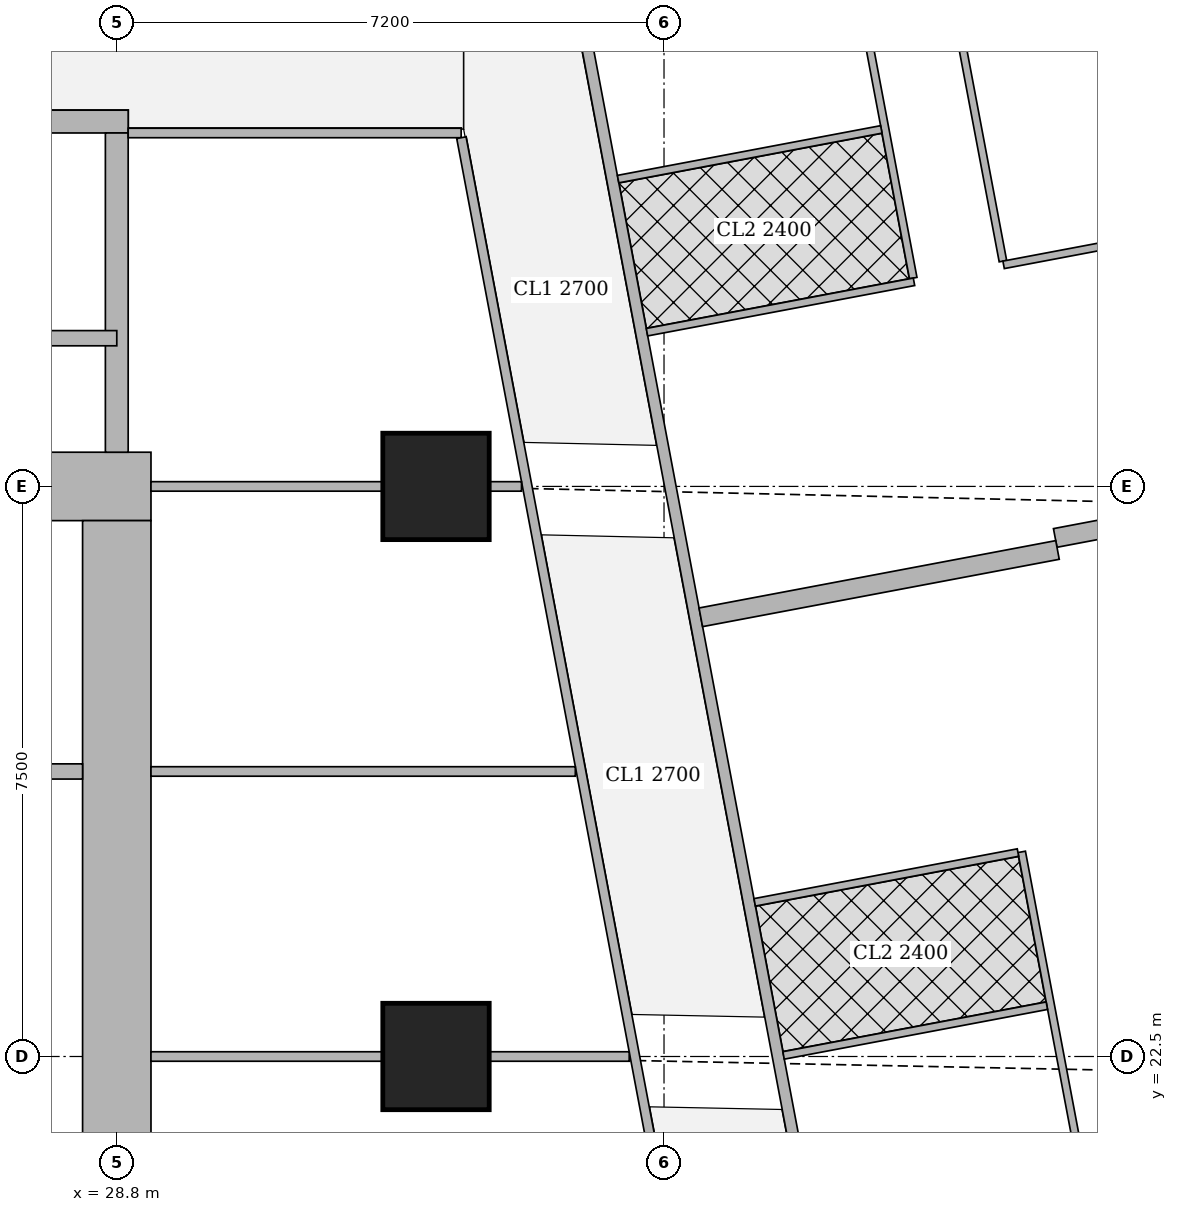
"""IFC4 building model, lengths in metres.
Left out: names, types, materials, properties, quantities, classifications, styles, units other than length and angle.
Written with IfcOpenShell. Run it as: python <this file> out.ifc"""

import sys

from ifc_helpers import new_model, si_unit, direction, frame, frame_2d, origin, origin_2d, place, context, subcontext, project, spatial, rectangle, extrude, element, fill, save


model = new_model("IFC4")
c1 = context("Model", 3, precision=1e-05, world=origin(), true_north=direction((0.0, 1.0)))
c2 = subcontext(c1, "Body", "Model", "MODEL_VIEW")
j1 = project(units=[si_unit("LENGTHUNIT", "METRE"), si_unit("PLANEANGLEUNIT", "RADIAN")], contexts=[c1])
p1 = place(None, origin())
s1 = spatial("IfcSite", under=j1, at=p1, CompositionType="ELEMENT")
p2 = place(p1, origin())
s2 = spatial("IfcBuilding", under=s1, at=p2, CompositionType="ELEMENT")
p3 = place(p2, frame((0.0, 0.0, 204.95)))
s3 = spatial("IfcBuildingStorey", under=s2, at=p3, CompositionType="ELEMENT", Elevation=204.95)
for number, where, z_axis, x_axis in (
    (1, (33.0, 22.5, 0.0), (0.0, 0.0, 1.0), (1.0, 0.0, 0.0)),
    (2, (33.0, 30.0, 0.0), (0.0, 0.0, 1.0), (1.0, 0.0, 0.0)),
):
    element("IfcColumn", number, at=place(p3, frame(where, z_axis=z_axis, x_axis=x_axis)), inside=s3, PredefinedType="COLUMN", context=c2, shape_type="SweptSolid", body=[
        extrude(rectangle(XDim=1.4, YDim=1.4, at=origin_2d()), origin(), (0.0, 0.0, 1.0), 3.75),
    ])
p4 = place(p3, frame((13.95, 30.0, 0.0), z_axis=(0.0, 0.0, 1.0), x_axis=(1.0, 0.0, 0.0)))
e3 = element("IfcWall", 3, at=p4, inside=s3, PredefinedType="SHEAR", context=c2, shape_type="SweptSolid", body=[
    extrude(rectangle(XDim=15.3, YDim=0.9, at=frame_2d((7.65, 0.0))), origin(), (0.0, 0.0, 1.0), 3.75),
])
p5 = place(p4, frame((4.45, 0.0, 0.0)))
e4 = element("IfcOpeningElement", 4, at=p5, cuts=e3, PredefinedType="OPENING", context=c2, shape_type="SweptSolid", body=[
    extrude(rectangle(XDim=1.8, YDim=2.1, at=frame_2d((0.9, 1.05))), frame((0.0, 0.46, 0.0), z_axis=(0.0, -1.0, 0.0), x_axis=(1.0, 0.0, 0.0)), (0.0, 0.0, 1.0), 0.92),
])
p6 = place(p4, frame((10.7, 0.0, 0.0)))
e5 = element("IfcOpeningElement", 5, at=p6, cuts=e3, PredefinedType="OPENING", context=c2, shape_type="SweptSolid", body=[
    extrude(rectangle(XDim=1.1, YDim=2.1, at=frame_2d((0.55, 1.05))), frame((0.0, 0.46, 0.0), z_axis=(0.0, -1.0, 0.0), x_axis=(1.0, 0.0, 0.0)), (0.0, 0.0, 1.0), 0.92),
])
p7 = place(p3, frame((28.8, 15.45, 0.0), z_axis=(0.0, 0.0, 1.0), x_axis=(0.0, 1.0, 0.0)))
e6 = element("IfcWall", 6, at=p7, inside=s3, PredefinedType="SHEAR", context=c2, shape_type="SweptSolid", body=[
    extrude(rectangle(XDim=14.1, YDim=0.9, at=frame_2d((7.05, 0.0))), origin(), (0.0, 0.0, 1.0), 3.75),
])
p8 = place(p3, frame((21.45, 34.8, 0.0), z_axis=(0.0, 0.0, 1.0), x_axis=(1.0, 0.0, 0.0)))
e7 = element("IfcWall", 7, at=p8, inside=s3, PredefinedType="SHEAR", context=c2, shape_type="SweptSolid", body=[
    extrude(rectangle(XDim=7.5, YDim=0.3, at=frame_2d((3.75, 0.0))), origin(), (0.0, 0.0, 1.0), 3.75),
])
p9 = place(p8, frame((0.5, 0.0, 0.0)))
e8 = element("IfcOpeningElement", 8, at=p9, cuts=e7, PredefinedType="OPENING", context=c2, shape_type="SweptSolid", body=[
    extrude(rectangle(XDim=1.1, YDim=2.1, at=frame_2d((0.55, 1.05))), frame((0.0, 0.16, 0.0), z_axis=(0.0, -1.0, 0.0), x_axis=(1.0, 0.0, 0.0)), (0.0, 0.0, 1.0), 0.32),
])
p10 = place(p3, frame((28.8, 30.45, 0.0), z_axis=(0.0, 0.0, 1.0), x_axis=(0.0, 1.0, 0.0)))
e9 = element("IfcWall", 9, at=p10, inside=s3, PredefinedType="SHEAR", context=c2, shape_type="SweptSolid", body=[
    extrude(rectangle(XDim=4.2, YDim=0.3, at=frame_2d((2.1, 0.0))), origin(), (0.0, 0.0, 1.0), 3.75),
])
p11 = place(p3, frame((33.68, 42.723, 0.0), z_axis=(0.0, 0.0, 1.0), x_axis=(0.185601160014, -0.982625162207, 0.0)))
e10 = element("IfcWall", 10, at=p11, inside=s3, PredefinedType="SOLIDWALL", context=c2, shape_type="SweptSolid", body=[
    extrude(rectangle(XDim=41.051, YDim=0.15, at=frame_2d((20.526, 0.0))), origin(), (0.0, 0.0, 1.0), 2.5),
])
p12 = place(p11, frame((12.307, 0.0, 0.0)))
e11 = element("IfcOpeningElement", 11, at=p12, cuts=e10, PredefinedType="OPENING", context=c2, shape_type="SweptSolid", body=[
    extrude(rectangle(XDim=1.0, YDim=2.1, at=frame_2d((0.5, 1.05))), frame((0.0, 0.085, 0.0), z_axis=(0.0, -1.0, 0.0), x_axis=(1.0, 0.0, 0.0)), (0.0, 0.0, 1.0), 0.17),
])
p13 = place(p11, frame((16.123, 0.0, 0.0)))
e12 = element("IfcOpeningElement", 12, at=p13, cuts=e10, PredefinedType="OPENING", context=c2, shape_type="SweptSolid", body=[
    extrude(rectangle(XDim=1.0, YDim=2.1, at=frame_2d((0.5, 1.05))), frame((0.0, 0.085, 0.0), z_axis=(0.0, -1.0, 0.0), x_axis=(1.0, 0.0, 0.0)), (0.0, 0.0, 1.0), 0.17),
])
p14 = place(p11, frame((30.902, 0.0, 0.0)))
e13 = element("IfcOpeningElement", 13, at=p14, cuts=e10, PredefinedType="OPENING", context=c2, shape_type="SweptSolid", body=[
    extrude(rectangle(XDim=1.0, YDim=2.1, at=frame_2d((0.5, 1.05))), frame((0.0, 0.085, 0.0), z_axis=(0.0, -1.0, 0.0), x_axis=(1.0, 0.0, 0.0)), (0.0, 0.0, 1.0), 0.17),
])
p15 = place(p3, frame((38.764, 41.941, 0.0), z_axis=(0.0, 0.0, 1.0), x_axis=(0.185548572312, -0.982635093671, 0.0)))
e14 = element("IfcWall", 14, at=p15, inside=s3, PredefinedType="PARTITIONING", context=c2, shape_type="SweptSolid", body=[
    extrude(rectangle(XDim=9.135, YDim=0.1, at=frame_2d((4.568, 0.0))), origin(), (0.0, 0.0, 1.0), 3.5),
])
p16 = place(p15, frame((8.085, 0.0, 0.0)))
e15 = element("IfcOpeningElement", 15, at=p16, cuts=e14, PredefinedType="OPENING", context=c2, shape_type="SweptSolid", body=[
    extrude(rectangle(XDim=0.9, YDim=2.1, at=frame_2d((0.45, 1.05))), frame((0.0, 0.06, 0.0), z_axis=(0.0, -1.0, 0.0), x_axis=(1.0, 0.0, 0.0)), (0.0, 0.0, 1.0), 0.12),
])
p17 = place(p15, frame((3.7, 0.0, 0.0)))
e16 = element("IfcOpeningElement", 16, at=p17, cuts=e14, PredefinedType="OPENING", context=c2, shape_type="SweptSolid", body=[
    extrude(rectangle(XDim=0.9, YDim=2.1, at=frame_2d((0.45, 1.05))), frame((0.0, 0.06, 0.0), z_axis=(0.0, -1.0, 0.0), x_axis=(1.0, 0.0, 0.0)), (0.0, 0.0, 1.0), 0.12),
])
p18 = place(p3, frame((37.473, 42.309, 0.0), z_axis=(0.0, 0.0, 1.0), x_axis=(0.185491912953, -0.982645790827, 0.0)))
e17 = element("IfcWall", 17, at=p18, inside=s3, PredefinedType="PARTITIONING", context=c2, shape_type="SweptSolid", body=[
    extrude(rectangle(XDim=9.737, YDim=0.1, at=frame_2d((4.869, 0.0))), origin(), (0.0, 0.0, 1.0), 3.5),
])
p19 = place(p18, frame((8.312, 0.0, 0.0)))
e18 = element("IfcOpeningElement", 18, at=p19, cuts=e17, PredefinedType="OPENING", context=c2, shape_type="SweptSolid", body=[
    extrude(rectangle(XDim=0.9, YDim=2.1, at=frame_2d((0.45, 1.05))), frame((0.0, 0.06, 0.0), z_axis=(0.0, -1.0, 0.0), x_axis=(1.0, 0.0, 0.0)), (0.0, 0.0, 1.0), 0.12),
])
p20 = place(p18, frame((2.853, 0.0, 0.0)))
e19 = element("IfcOpeningElement", 19, at=p20, cuts=e17, PredefinedType="OPENING", context=c2, shape_type="SweptSolid", body=[
    extrude(rectangle(XDim=0.9, YDim=2.1, at=frame_2d((0.45, 1.05))), frame((0.0, 0.06, 0.0), z_axis=(0.0, -1.0, 0.0), x_axis=(1.0, 0.0, 0.0)), (0.0, 0.0, 1.0), 0.12),
])
p21 = place(p18, frame((5.644, 0.0, 0.0)))
e20 = element("IfcOpeningElement", 20, at=p21, cuts=e17, PredefinedType="OPENING", context=c2, shape_type="SweptSolid", body=[
    extrude(rectangle(XDim=0.9, YDim=2.1, at=frame_2d((0.45, 1.05))), frame((0.0, 0.06, 0.0), z_axis=(0.0, -1.0, 0.0), x_axis=(1.0, 0.0, 0.0)), (0.0, 0.0, 1.0), 0.12),
])
p22 = place(p3, frame((44.693, 33.713, 0.0), z_axis=(0.0, 0.0, 1.0), x_axis=(-0.982633535512, -0.185556823879, 0.0)))
e21 = element("IfcWall", 21, at=p22, inside=s3, PredefinedType="PARTITIONING", context=c2, shape_type="SweptSolid", body=[
    extrude(rectangle(XDim=4.3, YDim=0.1, at=frame_2d((2.15, 0.0))), origin(), (0.0, 0.0, 1.0), 2.05),
])
p23 = place(p3, frame((39.289, 32.692, 0.0), z_axis=(0.0, 0.0, 1.0), x_axis=(-0.982662827464, -0.185401638399, 0.0)))
e22 = element("IfcWall", 22, at=p23, inside=s3, PredefinedType="PARTITIONING", context=c2, shape_type="SweptSolid", body=[
    extrude(rectangle(XDim=3.575, YDim=0.1, at=frame_2d((1.788, 0.0))), origin(), (0.0, 0.0, 1.0), 3.5),
])
p24 = place(p3, frame((38.859, 34.697, 0.0), z_axis=(0.0, 0.0, 1.0), x_axis=(-0.982626628545, -0.185593396635, 0.0)))
e23 = element("IfcWall", 23, at=p24, inside=s3, PredefinedType="PARTITIONING", context=c2, shape_type="SweptSolid", body=[
    extrude(rectangle(XDim=3.524, YDim=0.1, at=frame_2d((1.762, 0.0))), origin(), (0.0, 0.0, 1.0), 3.5),
])
p25 = place(p3, frame((40.706, 25.192, 0.0), z_axis=(0.0, 0.0, 1.0), x_axis=(0.185629824463, -0.982619747547, 0.0)))
e24 = element("IfcWall", 24, at=p25, inside=s3, PredefinedType="PARTITIONING", context=c2, shape_type="SweptSolid", body=[
    extrude(rectangle(XDim=9.659, YDim=0.1, at=frame_2d((4.83, 0.0))), origin(), (0.0, 0.0, 1.0), 2.5),
])
p26 = place(p25, frame((0.575, 0.0, 0.0)))
e25 = element("IfcOpeningElement", 25, at=p26, cuts=e24, PredefinedType="OPENING", context=c2, shape_type="SweptSolid", body=[
    extrude(rectangle(XDim=0.9, YDim=2.1, at=frame_2d((0.45, 1.05))), frame((0.0, 0.06, 0.0), z_axis=(0.0, -1.0, 0.0), x_axis=(1.0, 0.0, 0.0)), (0.0, 0.0, 1.0), 0.12),
])
p27 = place(p25, frame((4.166, 0.0, 0.0)))
e26 = element("IfcOpeningElement", 26, at=p27, cuts=e24, PredefinedType="OPENING", context=c2, shape_type="SweptSolid", body=[
    extrude(rectangle(XDim=0.9, YDim=2.1, at=frame_2d((0.45, 1.05))), frame((0.0, 0.06, 0.0), z_axis=(0.0, -1.0, 0.0), x_axis=(1.0, 0.0, 0.0)), (0.0, 0.0, 1.0), 0.12),
])
p28 = place(p25, frame((2.483, 0.0, 0.0)))
e27 = element("IfcOpeningElement", 27, at=p28, cuts=e24, PredefinedType="OPENING", context=c2, shape_type="SweptSolid", body=[
    extrude(rectangle(XDim=0.9, YDim=2.1, at=frame_2d((0.45, 1.05))), frame((0.0, 0.06, 0.0), z_axis=(0.0, -1.0, 0.0), x_axis=(1.0, 0.0, 0.0)), (0.0, 0.0, 1.0), 0.12),
])
p29 = place(p25, frame((6.074, 0.0, 0.0)))
e28 = element("IfcOpeningElement", 28, at=p29, cuts=e24, PredefinedType="OPENING", context=c2, shape_type="SweptSolid", body=[
    extrude(rectangle(XDim=0.9, YDim=2.1, at=frame_2d((0.45, 1.05))), frame((0.0, 0.06, 0.0), z_axis=(0.0, -1.0, 0.0), x_axis=(1.0, 0.0, 0.0)), (0.0, 0.0, 1.0), 0.12),
])
p30 = place(p3, frame((40.657, 25.183, 0.0), z_axis=(0.0, 0.0, 1.0), x_axis=(-0.982585626838, -0.185810349366, 0.0)))
e29 = element("IfcWall", 29, at=p30, inside=s3, PredefinedType="PARTITIONING", context=c2, shape_type="SweptSolid", body=[
    extrude(rectangle(XDim=3.525, YDim=0.1, at=frame_2d((1.763, 0.0))), origin(), (0.0, 0.0, 1.0), 3.5),
])
p31 = place(p3, frame((41.037, 23.168, 0.0), z_axis=(0.0, 0.0, 1.0), x_axis=(-0.982638553676, -0.185530247748, 0.0)))
e30 = element("IfcWall", 30, at=p31, inside=s3, PredefinedType="PARTITIONING", context=c2, shape_type="SweptSolid", body=[
    extrude(rectangle(XDim=3.525, YDim=0.1, at=frame_2d((1.763, 0.0))), origin(), (0.0, 0.0, 1.0), 2.5),
])
p32 = place(p3, frame((42.256, 29.532, 0.0), z_axis=(0.0, 0.0, 1.0), x_axis=(-0.982549954272, -0.185998890749, 0.0)))
e31 = element("IfcWall", 31, at=p32, inside=s3, PredefinedType="SOLIDWALL", context=c2, shape_type="SweptSolid", body=[
    extrude(rectangle(XDim=1.129, YDim=0.25, at=frame_2d((0.564, 0.0))), origin(), (0.0, 0.0, 1.0), 2.05),
])
p33 = place(p3, frame((41.177, 29.164, 0.0), z_axis=(0.0, 0.0, 1.0), x_axis=(-0.982642846239, -0.185507511263, 0.0)))
e32 = element("IfcWall", 32, at=p33, inside=s3, PredefinedType="SOLIDWALL", context=c2, shape_type="SweptSolid", body=[
    extrude(rectangle(XDim=4.776, YDim=0.25, at=frame_2d((2.388, 0.0))), origin(), (0.0, 0.0, 1.0), 2.5),
])
p34 = place(p3, frame((28.95, 34.65, 0.0), z_axis=(0.0, 0.0, 1.0), x_axis=(1.0, 0.0, 0.0)))
e33 = element("IfcWall", 33, at=p34, inside=s3, PredefinedType="PARTITIONING", context=c2, shape_type="SweptSolid", body=[
    extrude(rectangle(XDim=4.381, YDim=0.125, at=frame_2d((2.19, 0.0))), origin(), (0.0, 0.0, 1.0), 3.5),
])
p35 = place(p3, frame((37.9, 10.413, 0.0), z_axis=(0.0, 0.0, 1.0), x_axis=(-0.185589740669, 0.982627319058, 0.0)))
e34 = element("IfcWall", 34, at=p35, inside=s3, PredefinedType="PARTITIONING", context=c2, shape_type="SweptSolid", body=[
    extrude(rectangle(XDim=24.602, YDim=0.125, at=frame_2d((12.301, 0.0))), origin(), (0.0, 0.0, 1.0), 2.5),
])
p36 = place(p35, frame((0.708, 0.0, 0.0)))
e35 = element("IfcOpeningElement", 35, at=p36, cuts=e34, PredefinedType="OPENING", context=c2, shape_type="SweptSolid", body=[
    extrude(rectangle(XDim=1.0, YDim=2.1, at=frame_2d((0.5, 1.05))), frame((0.0, 0.073, 0.0), z_axis=(0.0, -1.0, 0.0), x_axis=(1.0, 0.0, 0.0)), (0.0, 0.0, 1.0), 0.145),
])
p37 = place(p35, frame((5.65, 0.0, 0.0)))
e36 = element("IfcOpeningElement", 36, at=p37, cuts=e34, PredefinedType="OPENING", context=c2, shape_type="SweptSolid", body=[
    extrude(rectangle(XDim=1.0, YDim=2.1, at=frame_2d((0.5, 1.05))), frame((0.0, 0.073, 0.0), z_axis=(0.0, -1.0, 0.0), x_axis=(1.0, 0.0, 0.0)), (0.0, 0.0, 1.0), 0.145),
])
p38 = place(p35, frame((13.124, 0.0, 0.0)))
e37 = element("IfcOpeningElement", 37, at=p38, cuts=e34, PredefinedType="OPENING", context=c2, shape_type="SweptSolid", body=[
    extrude(rectangle(XDim=1.0, YDim=2.1, at=frame_2d((0.5, 1.05))), frame((0.0, 0.073, 0.0), z_axis=(0.0, -1.0, 0.0), x_axis=(1.0, 0.0, 0.0)), (0.0, 0.0, 1.0), 0.145),
])
p39 = place(p35, frame((16.94, 0.0, 0.0)))
e38 = element("IfcOpeningElement", 38, at=p39, cuts=e34, PredefinedType="OPENING", context=c2, shape_type="SweptSolid", body=[
    extrude(rectangle(XDim=1.0, YDim=2.1, at=frame_2d((0.5, 1.05))), frame((0.0, 0.073, 0.0), z_axis=(0.0, -1.0, 0.0), x_axis=(1.0, 0.0, 0.0)), (0.0, 0.0, 1.0), 0.145),
])
p40 = place(p35, frame((20.9, 0.0, 0.0)))
e39 = element("IfcOpeningElement", 39, at=p40, cuts=e34, PredefinedType="OPENING", context=c2, shape_type="SweptSolid", body=[
    extrude(rectangle(XDim=1.0, YDim=2.1, at=frame_2d((0.5, 1.05))), frame((0.0, 0.073, 0.0), z_axis=(0.0, -1.0, 0.0), x_axis=(1.0, 0.0, 0.0)), (0.0, 0.0, 1.0), 0.145),
])
p41 = place(p3, frame((29.25, 22.5, 0.0), z_axis=(0.0, 0.0, 1.0), x_axis=(1.0, 0.0, 0.0)))
e40 = element("IfcWall", 40, at=p41, inside=s3, PredefinedType="PARTITIONING", context=c2, shape_type="SweptSolid", body=[
    extrude(rectangle(XDim=3.049, YDim=0.125, at=frame_2d((1.524, 0.0))), origin(), (0.0, 0.0, 1.0), 3.5),
])
p42 = place(p3, frame((33.701, 22.5, 0.0), z_axis=(0.0, 0.0, 1.0), x_axis=(1.0, 0.0, 0.0)))
e41 = element("IfcWall", 41, at=p42, inside=s3, PredefinedType="PARTITIONING", context=c2, shape_type="SweptSolid", body=[
    extrude(rectangle(XDim=1.841, YDim=0.125, at=frame_2d((0.92, 0.0))), origin(), (0.0, 0.0, 1.0), 2.5),
])
p43 = place(p3, frame((29.25, 26.25, 0.0), z_axis=(0.0, 0.0, 1.0), x_axis=(1.0, 0.0, 0.0)))
e42 = element("IfcWall", 42, at=p43, inside=s3, PredefinedType="PARTITIONING", context=c2, shape_type="SweptSolid", body=[
    extrude(rectangle(XDim=5.583, YDim=0.125, at=frame_2d((2.792, 0.0))), origin(), (0.0, 0.0, 1.0), 3.5),
])
p44 = place(p3, frame((29.25, 30.0, 0.0), z_axis=(0.0, 0.0, 1.0), x_axis=(1.0, 0.0, 0.0)))
e43 = element("IfcWall", 43, at=p44, inside=s3, PredefinedType="PARTITIONING", context=c2, shape_type="SweptSolid", body=[
    extrude(rectangle(XDim=3.049, YDim=0.125, at=frame_2d((1.524, 0.0))), origin(), (0.0, 0.0, 1.0), 3.5),
])
p45 = place(p3, frame((33.701, 30.0, 0.0), z_axis=(0.0, 0.0, 1.0), x_axis=(1.0, 0.0, 0.0)))
e44 = element("IfcWall", 44, at=p45, inside=s3, PredefinedType="PARTITIONING", context=c2, shape_type="SweptSolid", body=[
    extrude(rectangle(XDim=0.424, YDim=0.125, at=frame_2d((0.212, 0.0))), origin(), (0.0, 0.0, 1.0), 2.5),
])
p46 = place(p3, frame((23.0, 31.95, 0.0), z_axis=(0.0, 0.0, 1.0), x_axis=(1.0, 0.0, 0.0)))
e45 = element("IfcWall", 45, at=p46, inside=s3, PredefinedType="SHEAR", context=c2, shape_type="SweptSolid", body=[
    extrude(rectangle(XDim=5.8, YDim=0.2, at=frame_2d((2.9, 0.0))), origin(), (0.0, 0.0, 1.0), 3.75),
])
p47 = place(p3, frame((27.4, 26.25, 0.0), z_axis=(0.0, 0.0, 1.0), x_axis=(1.0, 0.0, 0.0)))
e46 = element("IfcWall", 46, at=p47, inside=s3, PredefinedType="SOLIDWALL", context=c2, shape_type="SweptSolid", body=[
    extrude(rectangle(XDim=0.95, YDim=0.2, at=frame_2d((0.475, 0.0))), origin(), (0.0, 0.0, 1.0), 3.5),
])
p48 = place(p16, origin())
e47 = element("IfcDoor", 47, at=p48, inside=s3, OperationType="SINGLE_SWING_RIGHT", PredefinedType="DOOR", context=c2, shape_type="SweptSolid", body=[
    extrude(rectangle(XDim=0.9, YDim=2.1, at=frame_2d((0.45, 1.05))), frame((0.0, 0.025, 0.0), z_axis=(0.0, -1.0, 0.0), x_axis=(1.0, 0.0, 0.0)), (0.0, 0.0, 1.0), 0.05),
])
fill(e15, e47)
p49 = place(p19, origin())
e48 = element("IfcDoor", 48, at=p49, inside=s3, OperationType="SINGLE_SWING_LEFT", PredefinedType="DOOR", context=c2, shape_type="SweptSolid", body=[
    extrude(rectangle(XDim=0.9, YDim=2.1, at=frame_2d((0.45, 1.05))), frame((0.0, 0.025, 0.0), z_axis=(0.0, -1.0, 0.0), x_axis=(1.0, 0.0, 0.0)), (0.0, 0.0, 1.0), 0.05),
])
fill(e18, e48)
p50 = place(p12, origin())
e49 = element("IfcDoor", 49, at=p50, inside=s3, OperationType="SINGLE_SWING_LEFT", PredefinedType="DOOR", context=c2, shape_type="SweptSolid", body=[
    extrude(rectangle(XDim=1.0, YDim=2.1, at=frame_2d((0.5, 1.05))), frame((0.0, 0.025, 0.0), z_axis=(0.0, -1.0, 0.0), x_axis=(1.0, 0.0, 0.0)), (0.0, 0.0, 1.0), 0.05),
])
fill(e11, e49)
p51 = place(p26, origin())
e50 = element("IfcDoor", 50, at=p51, inside=s3, OperationType="SINGLE_SWING_RIGHT", PredefinedType="DOOR", context=c2, shape_type="SweptSolid", body=[
    extrude(rectangle(XDim=0.9, YDim=2.1, at=frame_2d((0.45, 1.05))), frame((0.0, 0.025, 0.0), z_axis=(0.0, -1.0, 0.0), x_axis=(1.0, 0.0, 0.0)), (0.0, 0.0, 1.0), 0.05),
])
fill(e25, e50)
p52 = place(p28, origin())
e51 = element("IfcDoor", 51, at=p52, inside=s3, OperationType="SINGLE_SWING_LEFT", PredefinedType="DOOR", context=c2, shape_type="SweptSolid", body=[
    extrude(rectangle(XDim=0.9, YDim=2.1, at=frame_2d((0.45, 1.05))), frame((0.0, 0.025, 0.0), z_axis=(0.0, -1.0, 0.0), x_axis=(1.0, 0.0, 0.0)), (0.0, 0.0, 1.0), 0.05),
])
fill(e27, e51)
p53 = place(p13, origin())
e52 = element("IfcDoor", 52, at=p53, inside=s3, OperationType="SINGLE_SWING_RIGHT", PredefinedType="DOOR", context=c2, shape_type="SweptSolid", body=[
    extrude(rectangle(XDim=1.0, YDim=2.1, at=frame_2d((0.5, 1.05))), frame((0.0, 0.025, 0.0), z_axis=(0.0, -1.0, 0.0), x_axis=(1.0, 0.0, 0.0)), (0.0, 0.0, 1.0), 0.05),
])
fill(e12, e52)
p54 = place(p38, origin())
e53 = element("IfcDoor", 53, at=p54, inside=s3, OperationType="SINGLE_SWING_LEFT", PredefinedType="DOOR", context=c2, shape_type="SweptSolid", body=[
    extrude(rectangle(XDim=1.0, YDim=2.1, at=frame_2d((0.5, 1.05))), frame((0.0, 0.025, 0.0), z_axis=(0.0, -1.0, 0.0), x_axis=(1.0, 0.0, 0.0)), (0.0, 0.0, 1.0), 0.05),
])
fill(e37, e53)
p55 = place(p39, origin())
e54 = element("IfcDoor", 54, at=p55, inside=s3, OperationType="SINGLE_SWING_LEFT", PredefinedType="DOOR", context=c2, shape_type="SweptSolid", body=[
    extrude(rectangle(XDim=1.0, YDim=2.1, at=frame_2d((0.5, 1.05))), frame((0.0, 0.025, 0.0), z_axis=(0.0, -1.0, 0.0), x_axis=(1.0, 0.0, 0.0)), (0.0, 0.0, 1.0), 0.05),
])
fill(e38, e54)
p56 = place(p40, origin())
e55 = element("IfcDoor", 55, at=p56, inside=s3, OperationType="SINGLE_SWING_LEFT", PredefinedType="DOOR", context=c2, shape_type="SweptSolid", body=[
    extrude(rectangle(XDim=1.0, YDim=2.1, at=frame_2d((0.5, 1.05))), frame((0.0, 0.025, 0.0), z_axis=(0.0, -1.0, 0.0), x_axis=(1.0, 0.0, 0.0)), (0.0, 0.0, 1.0), 0.05),
])
fill(e39, e55)
save(model, sys.argv[1])
